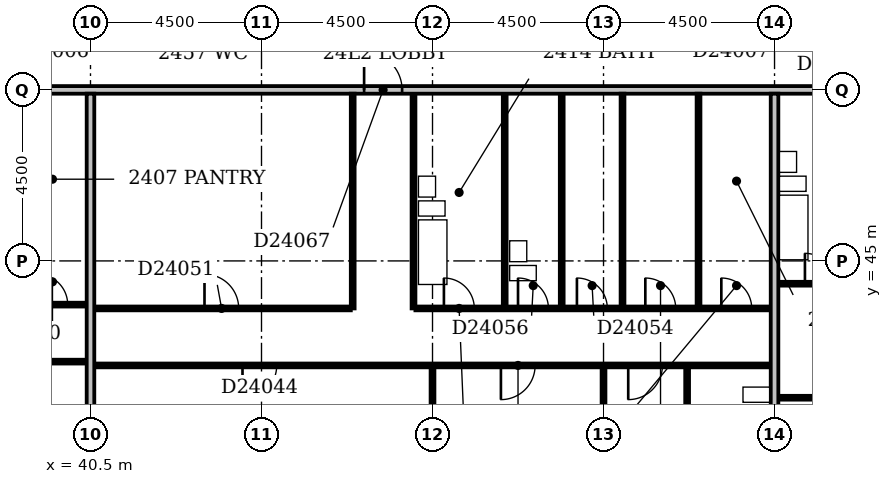
"""IFC4 building model, lengths in metres.
Left out: names, types, materials, properties, quantities, classifications, styles, units other than length and angle.
Written with IfcOpenShell. Run it as: python <this file> out.ifc"""

import sys

from ifc_helpers import new_model, si_unit, direction, frame, frame_2d, origin, place, context, subcontext, project, spatial, rectangle, extrude, element, fill, save


model = new_model("IFC4")
c1 = context("Model", 3, precision=1e-05, world=origin(), true_north=direction((0.0, 1.0)))
c2 = subcontext(c1, "Body", "Model", "MODEL_VIEW")
j1 = project(units=[si_unit("LENGTHUNIT", "METRE"), si_unit("PLANEANGLEUNIT", "RADIAN")], contexts=[c1])
p1 = place(None, origin())
s1 = spatial("IfcSite", under=j1, at=p1, CompositionType="ELEMENT")
p2 = place(p1, origin())
s2 = spatial("IfcBuilding", under=s1, at=p2, CompositionType="ELEMENT")
p3 = place(p2, frame((0.0, 0.0, 97.4)))
s3 = spatial("IfcBuildingStorey", under=s2, at=p3, CompositionType="ELEMENT", Elevation=97.4)
p4 = place(p3, frame((40.5, 36.6, 0.0), z_axis=(0.0, 0.0, 1.0), x_axis=(0.0, 1.0, 0.0)))
e1 = element("IfcWall", 1, at=p4, inside=s3, PredefinedType="PARTITIONING", context=c2, shape_type="SweptSolid", body=[
    extrude(rectangle(XDim=12.8, YDim=0.2, at=frame_2d((6.4, 0.0))), origin(), (0.0, 0.0, 1.0), 3.3),
])
p5 = place(p3, frame((49.5, 36.6, 0.0), z_axis=(0.0, 0.0, 1.0), x_axis=(0.0, 1.0, 0.0)))
e2 = element("IfcWall", 2, at=p5, inside=s3, PredefinedType="PARTITIONING", context=c2, shape_type="SweptSolid", body=[
    extrude(rectangle(XDim=5.6, YDim=0.1, at=frame_2d((2.8, 0.0))), origin(), (0.0, 0.0, 1.0), 3.3),
])
p6 = place(p3, frame((54.0, 36.6, 0.0), z_axis=(0.0, 0.0, 1.0), x_axis=(0.0, 1.0, 0.0)))
e3 = element("IfcWall", 3, at=p6, inside=s3, PredefinedType="PARTITIONING", context=c2, shape_type="SweptSolid", body=[
    extrude(rectangle(XDim=5.6, YDim=0.1, at=frame_2d((2.8, 0.0))), origin(), (0.0, 0.0, 1.0), 2.6),
])
p7 = place(p3, frame((58.5, 36.6, 0.0), z_axis=(0.0, 0.0, 1.0), x_axis=(0.0, 1.0, 0.0)))
e4 = element("IfcWall", 4, at=p7, inside=s3, PredefinedType="PARTITIONING", context=c2, shape_type="SweptSolid", body=[
    extrude(rectangle(XDim=12.8, YDim=0.2, at=frame_2d((6.4, 0.0))), origin(), (0.0, 0.0, 1.0), 3.3),
])
p8 = place(p3, frame((56.2, 39.35, 0.0), z_axis=(0.0, 0.0, 1.0), x_axis=(0.0, 1.0, 0.0)))
e5 = element("IfcWall", 5, at=p8, inside=s3, PredefinedType="PLUMBINGWALL", context=c2, shape_type="SweptSolid", body=[
    extrude(rectangle(XDim=2.85, YDim=0.1, at=frame_2d((1.425, 0.0))), origin(), (0.0, 0.0, 1.0), 3.3),
])
p9 = place(p8, frame((1.05, 0.0, 0.0)))
e6 = element("IfcOpeningElement", 6, at=p9, cuts=e5, PredefinedType="OPENING", context=c2, shape_type="SweptSolid", body=[
    extrude(rectangle(XDim=0.8, YDim=2.1, at=frame_2d((0.4, 1.05))), frame((0.0, 0.062, 0.0), z_axis=(0.0, -1.0, 0.0), x_axis=(1.0, 0.0, 0.0)), (0.0, 0.0, 1.0), 0.124),
])
p10 = place(p3, frame((58.6, 41.4, 0.0), z_axis=(0.0, 0.0, 1.0), x_axis=(1.0, 0.0, 0.0)))
e7 = element("IfcWall", 7, at=p10, inside=s3, PredefinedType="PARTITIONING", context=c2, shape_type="SweptSolid", body=[
    extrude(rectangle(XDim=9.5, YDim=0.1, at=frame_2d((4.75, 0.0))), origin(), (0.0, 0.0, 1.0), 3.3),
])
p11 = place(p10, frame((1.7, 0.0, 0.0)))
e8 = element("IfcOpeningElement", 8, at=p11, cuts=e7, PredefinedType="OPENING", context=c2, shape_type="SweptSolid", body=[
    extrude(rectangle(XDim=0.9, YDim=2.1, at=frame_2d((0.45, 1.05))), frame((0.0, 0.062, 0.0), z_axis=(0.0, -1.0, 0.0), x_axis=(1.0, 0.0, 0.0)), (0.0, 0.0, 1.0), 0.124),
])
p12 = place(p10, frame((6.2, 0.0, 0.0)))
e9 = element("IfcOpeningElement", 9, at=p12, cuts=e7, PredefinedType="OPENING", context=c2, shape_type="SweptSolid", body=[
    extrude(rectangle(XDim=0.9, YDim=2.1, at=frame_2d((0.45, 1.05))), frame((0.0, 0.062, 0.0), z_axis=(0.0, -1.0, 0.0), x_axis=(1.0, 0.0, 0.0)), (0.0, 0.0, 1.0), 0.124),
])
p13 = place(p3, frame((40.6, 42.25, 0.0), z_axis=(0.0, 0.0, 1.0), x_axis=(1.0, 0.0, 0.0)))
e10 = element("IfcWall", 10, at=p13, inside=s3, PredefinedType="PARTITIONING", context=c2, shape_type="SweptSolid", body=[
    extrude(rectangle(XDim=17.8, YDim=0.1, at=frame_2d((8.9, 0.0))), origin(), (0.0, 0.0, 1.0), 3.3),
])
p14 = place(p13, frame((3.9, 0.0, 0.0)))
e11 = element("IfcOpeningElement", 11, at=p14, cuts=e10, PredefinedType="OPENING", context=c2, shape_type="SweptSolid", body=[
    extrude(rectangle(XDim=0.9, YDim=2.1, at=frame_2d((0.45, 1.05))), frame((0.0, 0.062, 0.0), z_axis=(0.0, -1.0, 0.0), x_axis=(1.0, 0.0, 0.0)), (0.0, 0.0, 1.0), 0.124),
])
p15 = place(p13, frame((10.7, 0.0, 0.0)))
e12 = element("IfcOpeningElement", 12, at=p15, cuts=e10, PredefinedType="OPENING", context=c2, shape_type="SweptSolid", body=[
    extrude(rectangle(XDim=0.9, YDim=2.1, at=frame_2d((0.45, 1.05))), frame((0.0, 0.062, 0.0), z_axis=(0.0, -1.0, 0.0), x_axis=(1.0, 0.0, 0.0)), (0.0, 0.0, 1.0), 0.124),
])
p16 = place(p13, frame((14.05, 0.0, 0.0)))
e13 = element("IfcOpeningElement", 13, at=p16, cuts=e10, PredefinedType="OPENING", context=c2, shape_type="SweptSolid", body=[
    extrude(rectangle(XDim=0.9, YDim=2.1, at=frame_2d((0.45, 1.05))), frame((0.0, 0.062, 0.0), z_axis=(0.0, -1.0, 0.0), x_axis=(1.0, 0.0, 0.0)), (0.0, 0.0, 1.0), 0.124),
])
p17 = place(p3, frame((22.6, 42.35, 0.0), z_axis=(0.0, 0.0, 1.0), x_axis=(1.0, 0.0, 0.0)))
e14 = element("IfcWall", 14, at=p17, inside=s3, PredefinedType="PARTITIONING", context=c2, shape_type="SweptSolid", body=[
    extrude(rectangle(XDim=17.8, YDim=0.1, at=frame_2d((8.9, 0.0))), origin(), (0.0, 0.0, 1.0), 3.3),
])
p18 = place(p17, frame((1.7, 0.0, 0.0)))
e15 = element("IfcOpeningElement", 15, at=p18, cuts=e14, PredefinedType="OPENING", context=c2, shape_type="SweptSolid", body=[
    extrude(rectangle(XDim=0.9, YDim=2.1, at=frame_2d((0.45, 1.05))), frame((0.0, 0.062, 0.0), z_axis=(0.0, -1.0, 0.0), x_axis=(1.0, 0.0, 0.0)), (0.0, 0.0, 1.0), 0.124),
])
p19 = place(p17, frame((6.2, 0.0, 0.0)))
e16 = element("IfcOpeningElement", 16, at=p19, cuts=e14, PredefinedType="OPENING", context=c2, shape_type="SweptSolid", body=[
    extrude(rectangle(XDim=0.9, YDim=2.1, at=frame_2d((0.45, 1.05))), frame((0.0, 0.062, 0.0), z_axis=(0.0, -1.0, 0.0), x_axis=(1.0, 0.0, 0.0)), (0.0, 0.0, 1.0), 0.124),
])
p20 = place(p17, frame((10.7, 0.0, 0.0)))
e17 = element("IfcOpeningElement", 17, at=p20, cuts=e14, PredefinedType="OPENING", context=c2, shape_type="SweptSolid", body=[
    extrude(rectangle(XDim=0.9, YDim=2.1, at=frame_2d((0.45, 1.05))), frame((0.0, 0.062, 0.0), z_axis=(0.0, -1.0, 0.0), x_axis=(1.0, 0.0, 0.0)), (0.0, 0.0, 1.0), 0.124),
])
p21 = place(p17, frame((15.2, 0.0, 0.0)))
e18 = element("IfcOpeningElement", 18, at=p21, cuts=e14, PredefinedType="OPENING", context=c2, shape_type="SweptSolid", body=[
    extrude(rectangle(XDim=0.9, YDim=2.1, at=frame_2d((0.45, 1.05))), frame((0.0, 0.062, 0.0), z_axis=(0.0, -1.0, 0.0), x_axis=(1.0, 0.0, 0.0)), (0.0, 0.0, 1.0), 0.124),
])
p22 = place(p3, frame((40.6, 43.75, 0.0), z_axis=(0.0, 0.0, 1.0), x_axis=(1.0, 0.0, 0.0)))
e19 = element("IfcWall", 19, at=p22, inside=s3, PredefinedType="PARTITIONING", context=c2, shape_type="SweptSolid", body=[
    extrude(rectangle(XDim=6.75, YDim=0.1, at=frame_2d((3.375, 0.0))), origin(), (0.0, 0.0, 1.0), 3.3),
])
p23 = place(p22, frame((2.9, 0.0, 0.0)))
e20 = element("IfcOpeningElement", 20, at=p23, cuts=e19, PredefinedType="OPENING", context=c2, shape_type="SweptSolid", body=[
    extrude(rectangle(XDim=0.9, YDim=2.1, at=frame_2d((0.45, 1.05))), frame((0.0, 0.062, 0.0), z_axis=(0.0, -1.0, 0.0), x_axis=(1.0, 0.0, 0.0)), (0.0, 0.0, 1.0), 0.124),
])
p24 = place(p3, frame((47.4, 43.75, 0.0), z_axis=(0.0, 0.0, 1.0), x_axis=(0.0, 1.0, 0.0)))
e21 = element("IfcWall", 21, at=p24, inside=s3, PredefinedType="PARTITIONING", context=c2, shape_type="SweptSolid", body=[
    extrude(rectangle(XDim=5.65, YDim=0.1, at=frame_2d((2.825, 0.0))), origin(), (0.0, 0.0, 1.0), 3.3),
])
p25 = place(p3, frame((49.0, 43.75, 0.0), z_axis=(0.0, 0.0, 1.0), x_axis=(0.0, 1.0, 0.0)))
e22 = element("IfcWall", 22, at=p25, inside=s3, PredefinedType="PLUMBINGWALL", context=c2, shape_type="SweptSolid", body=[
    extrude(rectangle(XDim=5.65, YDim=0.1, at=frame_2d((2.825, 0.0))), origin(), (0.0, 0.0, 1.0), 3.3),
])
p26 = place(p3, frame((49.05, 43.75, 0.0), z_axis=(0.0, 0.0, 1.0), x_axis=(1.0, 0.0, 0.0)))
e23 = element("IfcWall", 23, at=p26, inside=s3, PredefinedType="PARTITIONING", context=c2, shape_type="SweptSolid", body=[
    extrude(rectangle(XDim=9.35, YDim=0.1, at=frame_2d((4.675, 0.0))), origin(), (0.0, 0.0, 1.0), 3.3),
])
p27 = place(p26, frame((0.75, 0.0, 0.0)))
e24 = element("IfcOpeningElement", 24, at=p27, cuts=e23, PredefinedType="OPENING", context=c2, shape_type="SweptSolid", body=[
    extrude(rectangle(XDim=0.8, YDim=2.1, at=frame_2d((0.4, 1.05))), frame((0.0, 0.062, 0.0), z_axis=(0.0, -1.0, 0.0), x_axis=(1.0, 0.0, 0.0)), (0.0, 0.0, 1.0), 0.124),
])
p28 = place(p26, frame((8.05, 0.0, 0.0)))
e25 = element("IfcOpeningElement", 25, at=p28, cuts=e23, PredefinedType="OPENING", context=c2, shape_type="SweptSolid", body=[
    extrude(rectangle(XDim=0.8, YDim=2.1, at=frame_2d((0.4, 1.05))), frame((0.0, 0.062, 0.0), z_axis=(0.0, -1.0, 0.0), x_axis=(1.0, 0.0, 0.0)), (0.0, 0.0, 1.0), 0.124),
])
p29 = place(p26, frame((4.25, 0.0, 0.0)))
e26 = element("IfcOpeningElement", 26, at=p29, cuts=e23, PredefinedType="OPENING", context=c2, shape_type="SweptSolid", body=[
    extrude(rectangle(XDim=0.8, YDim=2.1, at=frame_2d((0.4, 1.05))), frame((0.0, 0.062, 0.0), z_axis=(0.0, -1.0, 0.0), x_axis=(1.0, 0.0, 0.0)), (0.0, 0.0, 1.0), 0.124),
])
p30 = place(p26, frame((6.05, 0.0, 0.0)))
e27 = element("IfcOpeningElement", 27, at=p30, cuts=e23, PredefinedType="OPENING", context=c2, shape_type="SweptSolid", body=[
    extrude(rectangle(XDim=0.8, YDim=2.1, at=frame_2d((0.4, 1.05))), frame((0.0, 0.062, 0.0), z_axis=(0.0, -1.0, 0.0), x_axis=(1.0, 0.0, 0.0)), (0.0, 0.0, 1.0), 0.124),
])
p31 = place(p26, frame((2.7, 0.0, 0.0)))
e28 = element("IfcOpeningElement", 28, at=p31, cuts=e23, PredefinedType="OPENING", context=c2, shape_type="SweptSolid", body=[
    extrude(rectangle(XDim=0.8, YDim=2.1, at=frame_2d((0.4, 1.05))), frame((0.0, 0.062, 0.0), z_axis=(0.0, -1.0, 0.0), x_axis=(1.0, 0.0, 0.0)), (0.0, 0.0, 1.0), 0.124),
])
for number, where, z_axis, x_axis in (
    (29, (51.4, 43.8, 0.0), (0.0, 0.0, 1.0), (0.0, 1.0, 0.0)),
    (30, (52.9, 43.8, 0.0), (0.0, 0.0, 1.0), (0.0, 1.0, 0.0)),
):
    element("IfcWall", number, at=place(p3, frame(where, z_axis=z_axis, x_axis=x_axis)), inside=s3, PredefinedType="PLUMBINGWALL", context=c2, shape_type="SweptSolid", body=[
        extrude(rectangle(XDim=5.6, YDim=0.1, at=frame_2d((2.8, 0.0))), origin(), (0.0, 0.0, 1.0), 3.3),
    ])
p32 = place(p3, frame((54.5, 43.8, 0.0), z_axis=(0.0, 0.0, 1.0), x_axis=(0.0, 1.0, 0.0)))
e31 = element("IfcWall", 31, at=p32, inside=s3, PredefinedType="PARTITIONING", context=c2, shape_type="SweptSolid", body=[
    extrude(rectangle(XDim=5.6, YDim=0.1, at=frame_2d((2.8, 0.0))), origin(), (0.0, 0.0, 1.0), 2.6),
])
p33 = place(p3, frame((56.5, 43.8, 0.0), z_axis=(0.0, 0.0, 1.0), x_axis=(0.0, 1.0, 0.0)))
e32 = element("IfcWall", 32, at=p33, inside=s3, PredefinedType="PARTITIONING", context=c2, shape_type="SweptSolid", body=[
    extrude(rectangle(XDim=5.6, YDim=0.1, at=frame_2d((2.8, 0.0))), origin(), (0.0, 0.0, 1.0), 3.3),
])
p34 = place(p3, frame((24.15, 43.85, 0.0), z_axis=(0.0, 0.0, 1.0), x_axis=(1.0, 0.0, 0.0)))
e33 = element("IfcWall", 33, at=p34, inside=s3, PredefinedType="PARTITIONING", context=c2, shape_type="SweptSolid", body=[
    extrude(rectangle(XDim=16.25, YDim=0.1, at=frame_2d((8.125, 0.0))), origin(), (0.0, 0.0, 1.0), 3.3),
])
p35 = place(p34, frame((6.95, 0.0, 0.0)))
e34 = element("IfcOpeningElement", 34, at=p35, cuts=e33, PredefinedType="OPENING", context=c2, shape_type="SweptSolid", body=[
    extrude(rectangle(XDim=0.8, YDim=2.1, at=frame_2d((0.4, 1.05))), frame((0.0, 0.062, 0.0), z_axis=(0.0, -1.0, 0.0), x_axis=(1.0, 0.0, 0.0)), (0.0, 0.0, 1.0), 0.124),
])
p36 = place(p34, frame((9.25, 0.0, 0.0)))
e35 = element("IfcOpeningElement", 35, at=p36, cuts=e33, PredefinedType="OPENING", context=c2, shape_type="SweptSolid", body=[
    extrude(rectangle(XDim=0.8, YDim=2.1, at=frame_2d((0.4, 1.05))), frame((0.0, 0.062, 0.0), z_axis=(0.0, -1.0, 0.0), x_axis=(1.0, 0.0, 0.0)), (0.0, 0.0, 1.0), 0.124),
])
p37 = place(p34, frame((2.6, 0.0, 0.0)))
e36 = element("IfcOpeningElement", 36, at=p37, cuts=e33, PredefinedType="OPENING", context=c2, shape_type="SweptSolid", body=[
    extrude(rectangle(XDim=0.9, YDim=2.1, at=frame_2d((0.45, 1.05))), frame((0.0, 0.062, 0.0), z_axis=(0.0, -1.0, 0.0), x_axis=(1.0, 0.0, 0.0)), (0.0, 0.0, 1.0), 0.124),
])
p38 = place(p34, frame((14.95, 0.0, 0.0)))
e37 = element("IfcOpeningElement", 37, at=p38, cuts=e33, PredefinedType="OPENING", context=c2, shape_type="SweptSolid", body=[
    extrude(rectangle(XDim=0.8, YDim=2.1, at=frame_2d((0.4, 1.05))), frame((0.0, 0.062, 0.0), z_axis=(0.0, -1.0, 0.0), x_axis=(1.0, 0.0, 0.0)), (0.0, 0.0, 1.0), 0.124),
])
p39 = place(p34, frame((11.15, 0.0, 0.0)))
e38 = element("IfcOpeningElement", 38, at=p39, cuts=e33, PredefinedType="OPENING", context=c2, shape_type="SweptSolid", body=[
    extrude(rectangle(XDim=0.8, YDim=2.1, at=frame_2d((0.4, 1.05))), frame((0.0, 0.062, 0.0), z_axis=(0.0, -1.0, 0.0), x_axis=(1.0, 0.0, 0.0)), (0.0, 0.0, 1.0), 0.124),
])
p40 = place(p34, frame((12.95, 0.0, 0.0)))
e39 = element("IfcOpeningElement", 39, at=p40, cuts=e33, PredefinedType="OPENING", context=c2, shape_type="SweptSolid", body=[
    extrude(rectangle(XDim=0.8, YDim=2.1, at=frame_2d((0.4, 1.05))), frame((0.0, 0.062, 0.0), z_axis=(0.0, -1.0, 0.0), x_axis=(1.0, 0.0, 0.0)), (0.0, 0.0, 1.0), 0.124),
])
p41 = place(p3, frame((58.6, 44.4, 0.0), z_axis=(0.0, 0.0, 1.0), x_axis=(1.0, 0.0, 0.0)))
e40 = element("IfcWall", 40, at=p41, inside=s3, PredefinedType="PARTITIONING", context=c2, shape_type="SweptSolid", body=[
    extrude(rectangle(XDim=2.25, YDim=0.1, at=frame_2d((1.125, 0.0))), origin(), (0.0, 0.0, 1.0), 3.3),
])
p42 = place(p41, frame((0.7, 0.0, 0.0)))
e41 = element("IfcOpeningElement", 41, at=p42, cuts=e40, PredefinedType="OPENING", context=c2, shape_type="SweptSolid", body=[
    extrude(rectangle(XDim=0.8, YDim=2.1, at=frame_2d((0.4, 1.05))), frame((0.0, 0.062, 0.0), z_axis=(0.0, -1.0, 0.0), x_axis=(1.0, 0.0, 0.0)), (0.0, 0.0, 1.0), 0.124),
])
p43 = place(p3, frame((9.1, 49.5, 0.0), z_axis=(0.0, 0.0, 1.0), x_axis=(1.0, 0.0, 0.0)))
e42 = element("IfcWall", 42, at=p43, inside=s3, PredefinedType="PARTITIONING", context=c2, shape_type="SweptSolid", body=[
    extrude(rectangle(XDim=57.8, YDim=0.2, at=frame_2d((28.9, 0.0))), origin(), (0.0, 0.0, 1.0), 3.3),
])
p44 = place(p43, frame((13.7, 0.0, 0.0)))
e43 = element("IfcOpeningElement", 43, at=p44, cuts=e42, PredefinedType="OPENING", context=c2, shape_type="SweptSolid", body=[
    extrude(rectangle(XDim=1.0, YDim=2.1, at=frame_2d((0.5, 1.05))), frame((0.0, 0.112, 0.0), z_axis=(0.0, -1.0, 0.0), x_axis=(1.0, 0.0, 0.0)), (0.0, 0.0, 1.0), 0.224),
])
p45 = place(p43, frame((38.6, 0.0, 0.0)))
e44 = element("IfcOpeningElement", 44, at=p45, cuts=e42, PredefinedType="OPENING", context=c2, shape_type="SweptSolid", body=[
    extrude(rectangle(XDim=1.0, YDim=2.1, at=frame_2d((0.5, 1.05))), frame((0.0, 0.112, 0.0), z_axis=(0.0, -1.0, 0.0), x_axis=(1.0, 0.0, 0.0)), (0.0, 0.0, 1.0), 0.224),
])
p46 = place(p43, frame((52.1, 0.0, 0.0)))
e45 = element("IfcOpeningElement", 45, at=p46, cuts=e42, PredefinedType="OPENING", context=c2, shape_type="SweptSolid", body=[
    extrude(rectangle(XDim=1.0, YDim=2.1, at=frame_2d((0.5, 1.05))), frame((0.0, 0.112, 0.0), z_axis=(0.0, -1.0, 0.0), x_axis=(1.0, 0.0, 0.0)), (0.0, 0.0, 1.0), 0.224),
])
p47 = place(p43, frame((6.15, 0.0, 0.0)))
e46 = element("IfcOpeningElement", 46, at=p47, cuts=e42, PredefinedType="OPENING", context=c2, shape_type="SweptSolid", body=[
    extrude(rectangle(XDim=0.9, YDim=2.1, at=frame_2d((0.45, 1.05))), frame((0.0, 0.112, 0.0), z_axis=(0.0, -1.0, 0.0), x_axis=(1.0, 0.0, 0.0)), (0.0, 0.0, 1.0), 0.224),
])
p48 = place(p43, frame((10.65, 0.0, 0.0)))
e47 = element("IfcOpeningElement", 47, at=p48, cuts=e42, PredefinedType="OPENING", context=c2, shape_type="SweptSolid", body=[
    extrude(rectangle(XDim=0.9, YDim=2.1, at=frame_2d((0.45, 1.05))), frame((0.0, 0.112, 0.0), z_axis=(0.0, -1.0, 0.0), x_axis=(1.0, 0.0, 0.0)), (0.0, 0.0, 1.0), 0.224),
])
p49 = place(p14, frame((0.9, 0.0, 0.0), z_axis=(0.0, 0.0, 1.0), x_axis=(-1.0, 0.0, 0.0)))
e48 = element("IfcDoor", 48, at=p49, inside=s3, OperationType="SINGLE_SWING_RIGHT", PredefinedType="DOOR", context=c2, shape_type="SweptSolid", body=[
    extrude(rectangle(XDim=0.9, YDim=2.1, at=frame_2d((0.45, 1.05))), frame((0.0, 0.025, 0.0), z_axis=(0.0, -1.0, 0.0), x_axis=(1.0, 0.0, 0.0)), (0.0, 0.0, 1.0), 0.05),
])
fill(e11, e48)
p50 = place(p15, frame((0.9, 0.0, 0.0), z_axis=(0.0, 0.0, 1.0), x_axis=(-1.0, 0.0, 0.0)))
e49 = element("IfcDoor", 49, at=p50, inside=s3, OperationType="SINGLE_SWING_RIGHT", PredefinedType="DOOR", context=c2, shape_type="SweptSolid", body=[
    extrude(rectangle(XDim=0.9, YDim=2.1, at=frame_2d((0.45, 1.05))), frame((0.0, 0.025, 0.0), z_axis=(0.0, -1.0, 0.0), x_axis=(1.0, 0.0, 0.0)), (0.0, 0.0, 1.0), 0.05),
])
fill(e12, e49)
p51 = place(p16, frame((0.9, 0.0, 0.0), z_axis=(0.0, 0.0, 1.0), x_axis=(-1.0, 0.0, 0.0)))
e50 = element("IfcDoor", 50, at=p51, inside=s3, OperationType="SINGLE_SWING_RIGHT", PredefinedType="DOOR", context=c2, shape_type="SweptSolid", body=[
    extrude(rectangle(XDim=0.9, YDim=2.1, at=frame_2d((0.45, 1.05))), frame((0.0, 0.025, 0.0), z_axis=(0.0, -1.0, 0.0), x_axis=(1.0, 0.0, 0.0)), (0.0, 0.0, 1.0), 0.05),
])
fill(e13, e50)
p52 = place(p23, origin())
e51 = element("IfcDoor", 51, at=p52, inside=s3, OperationType="SINGLE_SWING_LEFT", PredefinedType="DOOR", context=c2, shape_type="SweptSolid", body=[
    extrude(rectangle(XDim=0.9, YDim=2.1, at=frame_2d((0.45, 1.05))), frame((0.0, 0.025, 0.0), z_axis=(0.0, -1.0, 0.0), x_axis=(1.0, 0.0, 0.0)), (0.0, 0.0, 1.0), 0.05),
])
fill(e20, e51)
p53 = place(p27, origin())
e52 = element("IfcDoor", 52, at=p53, inside=s3, OperationType="SINGLE_SWING_LEFT", PredefinedType="DOOR", context=c2, shape_type="SweptSolid", body=[
    extrude(rectangle(XDim=0.8, YDim=2.1, at=frame_2d((0.4, 1.05))), frame((0.0, 0.025, 0.0), z_axis=(0.0, -1.0, 0.0), x_axis=(1.0, 0.0, 0.0)), (0.0, 0.0, 1.0), 0.05),
])
fill(e24, e52)
p54 = place(p28, origin())
e53 = element("IfcDoor", 53, at=p54, inside=s3, OperationType="SINGLE_SWING_LEFT", PredefinedType="DOOR", context=c2, shape_type="SweptSolid", body=[
    extrude(rectangle(XDim=0.8, YDim=2.1, at=frame_2d((0.4, 1.05))), frame((0.0, 0.025, 0.0), z_axis=(0.0, -1.0, 0.0), x_axis=(1.0, 0.0, 0.0)), (0.0, 0.0, 1.0), 0.05),
])
fill(e25, e53)
p55 = place(p29, origin())
e54 = element("IfcDoor", 54, at=p55, inside=s3, OperationType="SINGLE_SWING_LEFT", PredefinedType="DOOR", context=c2, shape_type="SweptSolid", body=[
    extrude(rectangle(XDim=0.8, YDim=2.1, at=frame_2d((0.4, 1.05))), frame((0.0, 0.025, 0.0), z_axis=(0.0, -1.0, 0.0), x_axis=(1.0, 0.0, 0.0)), (0.0, 0.0, 1.0), 0.05),
])
fill(e26, e54)
p56 = place(p30, origin())
e55 = element("IfcDoor", 55, at=p56, inside=s3, OperationType="SINGLE_SWING_LEFT", PredefinedType="DOOR", context=c2, shape_type="SweptSolid", body=[
    extrude(rectangle(XDim=0.8, YDim=2.1, at=frame_2d((0.4, 1.05))), frame((0.0, 0.025, 0.0), z_axis=(0.0, -1.0, 0.0), x_axis=(1.0, 0.0, 0.0)), (0.0, 0.0, 1.0), 0.05),
])
fill(e27, e55)
p57 = place(p31, origin())
e56 = element("IfcDoor", 56, at=p57, inside=s3, OperationType="SINGLE_SWING_LEFT", PredefinedType="DOOR", context=c2, shape_type="SweptSolid", body=[
    extrude(rectangle(XDim=0.8, YDim=2.1, at=frame_2d((0.4, 1.05))), frame((0.0, 0.025, 0.0), z_axis=(0.0, -1.0, 0.0), x_axis=(1.0, 0.0, 0.0)), (0.0, 0.0, 1.0), 0.05),
])
fill(e28, e56)
p58 = place(p38, origin())
e57 = element("IfcDoor", 57, at=p58, inside=s3, OperationType="SINGLE_SWING_LEFT", PredefinedType="DOOR", context=c2, shape_type="SweptSolid", body=[
    extrude(rectangle(XDim=0.8, YDim=2.1, at=frame_2d((0.4, 1.05))), frame((0.0, 0.025, 0.0), z_axis=(0.0, -1.0, 0.0), x_axis=(1.0, 0.0, 0.0)), (0.0, 0.0, 1.0), 0.05),
])
fill(e37, e57)
p59 = place(p42, origin())
e58 = element("IfcDoor", 58, at=p59, inside=s3, OperationType="SINGLE_SWING_LEFT", PredefinedType="DOOR", context=c2, shape_type="SweptSolid", body=[
    extrude(rectangle(XDim=0.8, YDim=2.1, at=frame_2d((0.4, 1.05))), frame((0.0, 0.025, 0.0), z_axis=(0.0, -1.0, 0.0), x_axis=(1.0, 0.0, 0.0)), (0.0, 0.0, 1.0), 0.05),
])
fill(e41, e58)
p60 = place(p45, origin())
e59 = element("IfcDoor", 59, at=p60, inside=s3, OperationType="SINGLE_SWING_LEFT", PredefinedType="DOOR", context=c2, shape_type="SweptSolid", body=[
    extrude(rectangle(XDim=1.0, YDim=2.1, at=frame_2d((0.5, 1.05))), frame((0.0, 0.025, 0.0), z_axis=(0.0, -1.0, 0.0), x_axis=(1.0, 0.0, 0.0)), (0.0, 0.0, 1.0), 0.05),
])
fill(e44, e59)
save(model, sys.argv[1])
